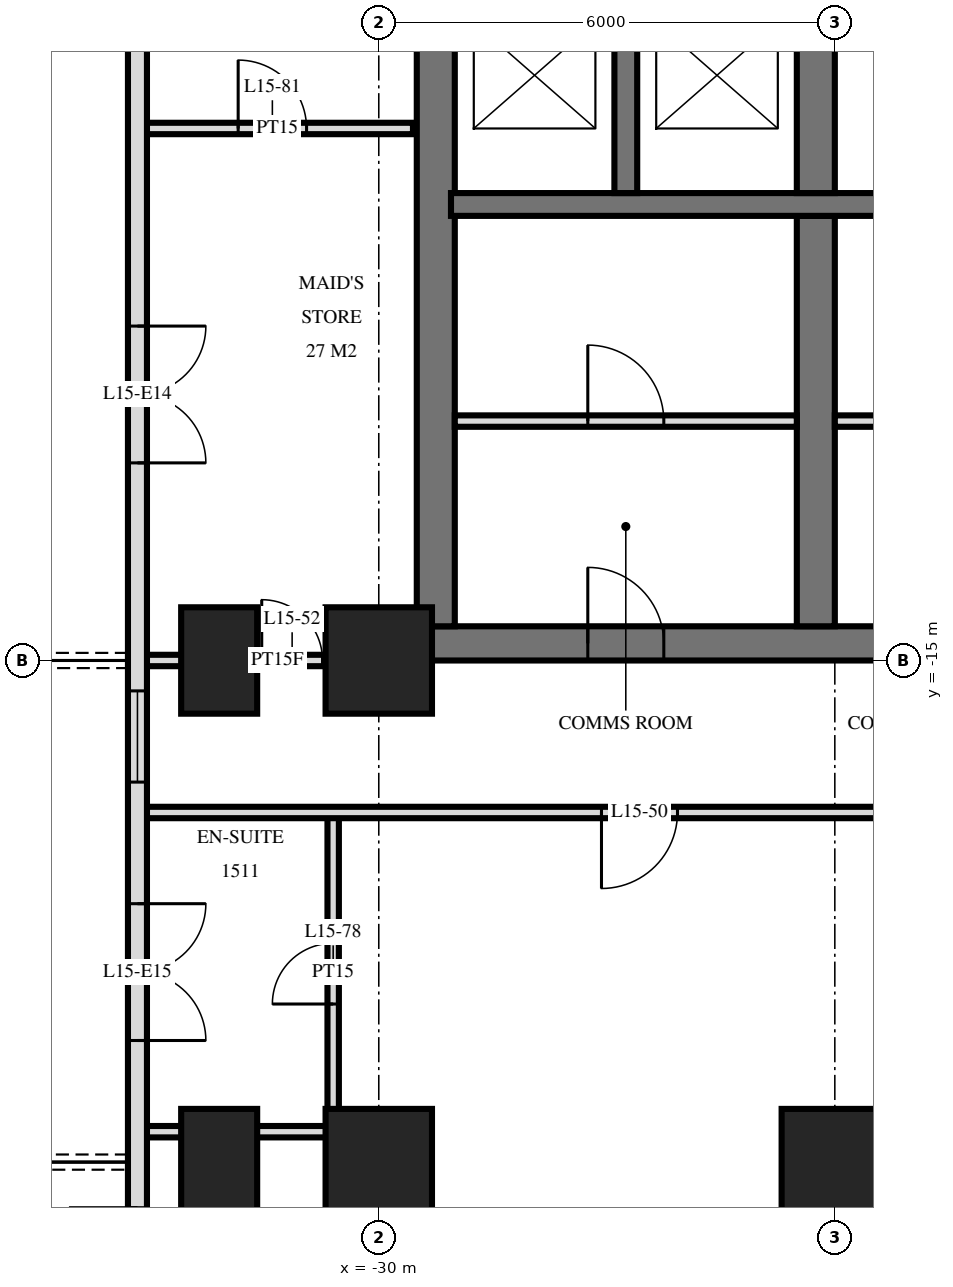
"""IFC4 building model, lengths in metres.
Left out: names, types, materials, properties, quantities, classifications, styles, units other than length and angle.
Written with IfcOpenShell. Run it as: python <this file> out.ifc"""

import sys

from ifc_helpers import new_model, si_unit, direction, frame, frame_2d, origin, origin_2d, place, context, subcontext, project, spatial, rectangle, extrude, element, fill, save


model = new_model("IFC4")
c1 = context("Model", 3, precision=1e-05, world=origin(), true_north=direction((0.0, 1.0)))
c2 = subcontext(c1, "Body", "Model", "MODEL_VIEW")
j1 = project(units=[si_unit("LENGTHUNIT", "METRE"), si_unit("PLANEANGLEUNIT", "RADIAN")], contexts=[c1])
p1 = place(None, origin())
s1 = spatial("IfcSite", under=j1, at=p1, CompositionType="ELEMENT")
p2 = place(p1, origin())
s2 = spatial("IfcBuilding", under=s1, at=p2, CompositionType="ELEMENT")
p3 = place(p2, frame((0.0, 0.0, 63.6)))
s3 = spatial("IfcBuildingStorey", under=s2, at=p3, CompositionType="ELEMENT", Elevation=63.6)
for number, where, z_axis, x_axis in (
    (1, (-32.1, -21.6, 0.0), (0.0, 0.0, 1.0), (0.0, 1.0, 0.0)),
    (2, (-32.1, -15.0, 0.0), (0.0, 0.0, 1.0), (0.0, 1.0, 0.0)),
):
    element("IfcColumn", number, at=place(p3, frame(where, z_axis=z_axis, x_axis=x_axis)), inside=s3, PredefinedType="COLUMN", context=c2, shape_type="SweptSolid", body=[
        extrude(rectangle(XDim=1.4, YDim=1.0, at=origin_2d()), origin(), (0.0, 0.0, 1.0), 3.6),
    ])
for number, where, z_axis, x_axis in (
    (3, (-30.0, -21.6, 0.0), (0.0, 0.0, 1.0), (1.0, 0.0, 0.0)),
    (4, (-30.0, -15.0, 0.0), (0.0, 0.0, 1.0), (1.0, 0.0, 0.0)),
    (5, (-24.0, -21.6, 0.0), (0.0, 0.0, 1.0), (1.0, 0.0, 0.0)),
):
    element("IfcColumn", number, at=place(p3, frame(where, z_axis=z_axis, x_axis=x_axis)), inside=s3, PredefinedType="COLUMN", context=c2, shape_type="SweptSolid", body=[
        extrude(rectangle(XDim=1.4, YDim=1.4, at=origin_2d()), origin(), (0.0, 0.0, 1.0), 3.6),
    ])
p4 = place(p3, frame((-29.5, -14.775, 0.0), z_axis=(0.0, 0.0, 1.0), x_axis=(1.0, 0.0, 0.0)))
e6 = element("IfcWall", 6, at=p4, inside=s3, PredefinedType="SHEAR", context=c2, shape_type="SweptSolid", body=[
    extrude(rectangle(XDim=19.5, YDim=0.45, at=frame_2d((9.75, 0.0))), origin(), (0.0, 0.0, 1.0), 3.6),
])
p5 = place(p4, frame((11.2, 0.0, 0.0)))
e7 = element("IfcOpeningElement", 7, at=p5, cuts=e6, PredefinedType="OPENING", context=c2, shape_type="SweptSolid", body=[
    extrude(rectangle(XDim=1.2, YDim=2.1, at=frame_2d((0.6, 1.05))), frame((0.0, 0.235, 0.0), z_axis=(0.0, -1.0, 0.0), x_axis=(1.0, 0.0, 0.0)), (0.0, 0.0, 1.0), 0.47),
])
p6 = place(p4, frame((14.25, 0.0, 0.0)))
e8 = element("IfcOpeningElement", 8, at=p6, cuts=e6, PredefinedType="OPENING", context=c2, shape_type="SweptSolid", body=[
    extrude(rectangle(XDim=1.1, YDim=2.1, at=frame_2d((0.55, 1.05))), frame((0.0, 0.235, 0.0), z_axis=(0.0, -1.0, 0.0), x_axis=(1.0, 0.0, 0.0)), (0.0, 0.0, 1.0), 0.47),
])
p7 = place(p4, frame((8.5, 0.0, 0.0)))
e9 = element("IfcOpeningElement", 9, at=p7, cuts=e6, PredefinedType="OPENING", context=c2, shape_type="SweptSolid", body=[
    extrude(rectangle(XDim=0.9, YDim=2.1, at=frame_2d((0.45, 1.05))), frame((0.0, 0.235, 0.0), z_axis=(0.0, -1.0, 0.0), x_axis=(1.0, 0.0, 0.0)), (0.0, 0.0, 1.0), 0.47),
])
p8 = place(p4, frame((6.05, 0.0, 0.0)))
e10 = element("IfcOpeningElement", 10, at=p8, cuts=e6, PredefinedType="OPENING", context=c2, shape_type="SweptSolid", body=[
    extrude(rectangle(XDim=1.0, YDim=2.1, at=frame_2d((0.5, 1.05))), frame((0.0, 0.235, 0.0), z_axis=(0.0, -1.0, 0.0), x_axis=(1.0, 0.0, 0.0)), (0.0, 0.0, 1.0), 0.47),
])
p9 = place(p4, frame((2.25, 0.0, 0.0)))
e11 = element("IfcOpeningElement", 11, at=p9, cuts=e6, PredefinedType="OPENING", context=c2, shape_type="SweptSolid", body=[
    extrude(rectangle(XDim=1.0, YDim=2.1, at=frame_2d((0.5, 1.05))), frame((0.0, 0.235, 0.0), z_axis=(0.0, -1.0, 0.0), x_axis=(1.0, 0.0, 0.0)), (0.0, 0.0, 1.0), 0.47),
])
p10 = place(p3, frame((-29.25, -14.55, 0.0), z_axis=(0.0, 0.0, 1.0), x_axis=(0.0, 1.0, 0.0)))
e12 = element("IfcWall", 12, at=p10, inside=s3, PredefinedType="SHEAR", context=c2, shape_type="SweptSolid", body=[
    extrude(rectangle(XDim=14.1, YDim=0.5, at=frame_2d((7.05, 0.0))), origin(), (0.0, 0.0, 1.0), 3.6),
])
p11 = place(p3, frame((-29.05, -9.0, 0.0), z_axis=(0.0, 0.0, 1.0), x_axis=(1.0, 0.0, 0.0)))
e13 = element("IfcWall", 13, at=p11, inside=s3, PredefinedType="SHEAR", context=c2, shape_type="SweptSolid", body=[
    extrude(rectangle(XDim=18.7, YDim=0.3, at=frame_2d((9.35, 0.0))), origin(), (0.0, 0.0, 1.0), 3.6),
])
p12 = place(p11, frame((13.8, 0.0, 0.0)))
e14 = element("IfcOpeningElement", 14, at=p12, cuts=e13, PredefinedType="OPENING", context=c2, shape_type="SweptSolid", body=[
    extrude(rectangle(XDim=1.1, YDim=2.1, at=frame_2d((0.55, 1.05))), frame((0.0, 0.16, 0.0), z_axis=(0.0, -1.0, 0.0), x_axis=(1.0, 0.0, 0.0)), (0.0, 0.0, 1.0), 0.32),
])
p13 = place(p3, frame((-24.25, -8.85, 0.0), z_axis=(0.0, 0.0, 1.0), x_axis=(0.0, 1.0, 0.0)))
e15 = element("IfcWall", 15, at=p13, inside=s3, PredefinedType="SHEAR", context=c2, shape_type="SweptSolid", body=[
    extrude(rectangle(XDim=2.3, YDim=0.5, at=frame_2d((1.15, 0.0))), origin(), (0.0, 0.0, 1.0), 3.6),
])
p14 = place(p3, frame((-24.25, -14.55, 0.0), z_axis=(0.0, 0.0, 1.0), x_axis=(0.0, 1.0, 0.0)))
e16 = element("IfcWall", 16, at=p14, inside=s3, PredefinedType="SHEAR", context=c2, shape_type="SweptSolid", body=[
    extrude(rectangle(XDim=5.4, YDim=0.5, at=frame_2d((2.7, 0.0))), origin(), (0.0, 0.0, 1.0), 3.6),
])
p15 = place(p3, frame((-26.75, -8.85, 0.0), z_axis=(0.0, 0.0, 1.0), x_axis=(0.0, 1.0, 0.0)))
e17 = element("IfcWall", 17, at=p15, inside=s3, PredefinedType="SHEAR", context=c2, shape_type="SweptSolid", body=[
    extrude(rectangle(XDim=2.3, YDim=0.3, at=frame_2d((1.15, 0.0))), origin(), (0.0, 0.0, 1.0), 3.6),
])
p16 = place(p3, frame((-33.175, -3.325, 0.0), z_axis=(0.0, 0.0, 1.0), x_axis=(0.0, -1.0, 0.0)))
e18 = element("IfcWall", 18, at=p16, inside=s3, PredefinedType="SOLIDWALL", context=c2, shape_type="SweptSolid", body=[
    extrude(rectangle(XDim=21.551, YDim=0.25, at=frame_2d((10.775, 0.0))), origin(), (0.0, 0.0, 1.0), 3.32),
])
p17 = place(p16, frame((7.275, 0.0, 0.0)))
e19 = element("IfcOpeningElement", 19, at=p17, cuts=e18, PredefinedType="OPENING", context=c2, shape_type="SweptSolid", body=[
    extrude(rectangle(XDim=1.8, YDim=2.4, at=frame_2d((0.9, 1.2))), frame((0.0, 0.135, 0.0), z_axis=(0.0, -1.0, 0.0), x_axis=(1.0, 0.0, 0.0)), (0.0, 0.0, 1.0), 0.27),
])
p18 = place(p16, frame((12.075, 0.0, 0.3)))
e20 = element("IfcOpeningElement", 20, at=p18, cuts=e18, PredefinedType="OPENING", context=c2, shape_type="SweptSolid", body=[
    extrude(rectangle(XDim=1.2, YDim=2.1, at=frame_2d((0.6, 1.05))), frame((0.0, 0.135, 0.0), z_axis=(0.0, -1.0, 0.0), x_axis=(1.0, 0.0, 0.0)), (0.0, 0.0, 1.0), 0.27),
])
p19 = place(p16, frame((14.875, 0.0, 0.0)))
e21 = element("IfcOpeningElement", 21, at=p19, cuts=e18, PredefinedType="OPENING", context=c2, shape_type="SweptSolid", body=[
    extrude(rectangle(XDim=1.8, YDim=2.4, at=frame_2d((0.9, 1.2))), frame((0.0, 0.135, 0.0), z_axis=(0.0, -1.0, 0.0), x_axis=(1.0, 0.0, 0.0)), (0.0, 0.0, 1.0), 0.27),
])
p20 = place(p16, frame((18.875, 0.0, 0.0)))
e22 = element("IfcOpeningElement", 22, at=p20, cuts=e18, PredefinedType="OPENING", context=c2, shape_type="SweptSolid", body=[
    extrude(rectangle(XDim=1.8, YDim=2.4, at=frame_2d((0.9, 1.2))), frame((0.0, 0.135, 0.0), z_axis=(0.0, -1.0, 0.0), x_axis=(1.0, 0.0, 0.0)), (0.0, 0.0, 1.0), 0.27),
])
p21 = place(p3, frame((-24.0, -11.85, 0.0), z_axis=(0.0, 0.0, 1.0), x_axis=(1.0, 0.0, 0.0)))
e23 = element("IfcWall", 23, at=p21, inside=s3, PredefinedType="PARTITIONING", context=c2, shape_type="SweptSolid", body=[
    extrude(rectangle(XDim=2.1, YDim=0.15, at=frame_2d((1.05, 0.0))), origin(), (0.0, 0.0, 1.0), 3.3),
])
p22 = place(p21, frame((0.55, 0.0, 0.0)))
e24 = element("IfcOpeningElement", 24, at=p22, cuts=e23, PredefinedType="OPENING", context=c2, shape_type="SweptSolid", body=[
    extrude(rectangle(XDim=1.0, YDim=2.1, at=frame_2d((0.5, 1.05))), frame((0.0, 0.085, 0.0), z_axis=(0.0, -1.0, 0.0), x_axis=(1.0, 0.0, 0.0)), (0.0, 0.0, 1.0), 0.17),
])
p23 = place(p3, frame((-29.0, -11.85, 0.0), z_axis=(0.0, 0.0, 1.0), x_axis=(1.0, 0.0, 0.0)))
e25 = element("IfcWall", 25, at=p23, inside=s3, PredefinedType="PARTITIONING", context=c2, shape_type="SweptSolid", body=[
    extrude(rectangle(XDim=4.5, YDim=0.15, at=frame_2d((2.25, 0.0))), origin(), (0.0, 0.0, 1.0), 3.3),
])
p24 = place(p23, frame((1.75, 0.0, 0.0)))
e26 = element("IfcOpeningElement", 26, at=p24, cuts=e25, PredefinedType="OPENING", context=c2, shape_type="SweptSolid", body=[
    extrude(rectangle(XDim=1.0, YDim=2.1, at=frame_2d((0.5, 1.05))), frame((0.0, 0.085, 0.0), z_axis=(0.0, -1.0, 0.0), x_axis=(1.0, 0.0, 0.0)), (0.0, 0.0, 1.0), 0.17),
])
p25 = place(p3, frame((-30.6, -21.2, 0.0), z_axis=(0.0, 0.0, 1.0), x_axis=(0.0, 1.0, 0.0)))
e27 = element("IfcWall", 27, at=p25, inside=s3, PredefinedType="PARTITIONING", context=c2, shape_type="SweptSolid", body=[
    extrude(rectangle(XDim=4.2, YDim=0.15, at=frame_2d((2.1, 0.0))), origin(), (0.0, 0.0, 1.0), 3.32),
])
p26 = place(p25, frame((1.68, 0.0, 0.0)))
e28 = element("IfcOpeningElement", 28, at=p26, cuts=e27, PredefinedType="OPENING", context=c2, shape_type="SweptSolid", body=[
    extrude(rectangle(XDim=0.8, YDim=2.1, at=frame_2d((0.4, 1.05))), frame((0.0, 0.085, 0.0), z_axis=(0.0, -1.0, 0.0), x_axis=(1.0, 0.0, 0.0)), (0.0, 0.0, 1.0), 0.17),
])
p27 = place(p3, frame((-33.12, -21.2, 0.0), z_axis=(0.0, 0.0, 1.0), x_axis=(1.0, 0.0, 0.0)))
e29 = element("IfcWall", 29, at=p27, inside=s3, PredefinedType="PARTITIONING", context=c2, shape_type="SweptSolid", body=[
    extrude(rectangle(XDim=2.52, YDim=0.15, at=frame_2d((1.26, 0.0))), origin(), (0.0, 0.0, 1.0), 3.32),
])
p28 = place(p3, frame((-33.12, -17.0, 0.0), z_axis=(0.0, 0.0, 1.0), x_axis=(1.0, 0.0, 0.0)))
e30 = element("IfcWall", 30, at=p28, inside=s3, PredefinedType="PARTITIONING", context=c2, shape_type="SweptSolid", body=[
    extrude(rectangle(XDim=66.24, YDim=0.15, at=frame_2d((33.12, 0.0))), origin(), (0.0, 0.0, 1.0), 3.32),
])
p29 = place(p28, frame((12.27, 0.0, 0.0)))
e31 = element("IfcOpeningElement", 31, at=p29, cuts=e30, PredefinedType="OPENING", context=c2, shape_type="SweptSolid", body=[
    extrude(rectangle(XDim=1.0, YDim=2.1, at=frame_2d((0.5, 1.05))), frame((0.0, 0.085, 0.0), z_axis=(0.0, -1.0, 0.0), x_axis=(1.0, 0.0, 0.0)), (0.0, 0.0, 1.0), 0.17),
])
p30 = place(p28, frame((16.97, 0.0, 0.0)))
e32 = element("IfcOpeningElement", 32, at=p30, cuts=e30, PredefinedType="OPENING", context=c2, shape_type="SweptSolid", body=[
    extrude(rectangle(XDim=1.0, YDim=2.1, at=frame_2d((0.5, 1.05))), frame((0.0, 0.085, 0.0), z_axis=(0.0, -1.0, 0.0), x_axis=(1.0, 0.0, 0.0)), (0.0, 0.0, 1.0), 0.17),
])
p31 = place(p28, frame((18.27, 0.0, 0.0)))
e33 = element("IfcOpeningElement", 33, at=p31, cuts=e30, PredefinedType="OPENING", context=c2, shape_type="SweptSolid", body=[
    extrude(rectangle(XDim=1.0, YDim=2.1, at=frame_2d((0.5, 1.05))), frame((0.0, 0.085, 0.0), z_axis=(0.0, -1.0, 0.0), x_axis=(1.0, 0.0, 0.0)), (0.0, 0.0, 1.0), 0.17),
])
p32 = place(p28, frame((22.97, 0.0, 0.0)))
e34 = element("IfcOpeningElement", 34, at=p32, cuts=e30, PredefinedType="OPENING", context=c2, shape_type="SweptSolid", body=[
    extrude(rectangle(XDim=1.0, YDim=2.1, at=frame_2d((0.5, 1.05))), frame((0.0, 0.085, 0.0), z_axis=(0.0, -1.0, 0.0), x_axis=(1.0, 0.0, 0.0)), (0.0, 0.0, 1.0), 0.17),
])
p33 = place(p28, frame((24.27, 0.0, 0.0)))
e35 = element("IfcOpeningElement", 35, at=p33, cuts=e30, PredefinedType="OPENING", context=c2, shape_type="SweptSolid", body=[
    extrude(rectangle(XDim=1.0, YDim=2.1, at=frame_2d((0.5, 1.05))), frame((0.0, 0.085, 0.0), z_axis=(0.0, -1.0, 0.0), x_axis=(1.0, 0.0, 0.0)), (0.0, 0.0, 1.0), 0.17),
])
p34 = place(p28, frame((28.97, 0.0, 0.0)))
e36 = element("IfcOpeningElement", 36, at=p34, cuts=e30, PredefinedType="OPENING", context=c2, shape_type="SweptSolid", body=[
    extrude(rectangle(XDim=1.0, YDim=2.1, at=frame_2d((0.5, 1.05))), frame((0.0, 0.085, 0.0), z_axis=(0.0, -1.0, 0.0), x_axis=(1.0, 0.0, 0.0)), (0.0, 0.0, 1.0), 0.17),
])
p35 = place(p28, frame((30.27, 0.0, 0.0)))
e37 = element("IfcOpeningElement", 37, at=p35, cuts=e30, PredefinedType="OPENING", context=c2, shape_type="SweptSolid", body=[
    extrude(rectangle(XDim=1.0, YDim=2.1, at=frame_2d((0.5, 1.05))), frame((0.0, 0.085, 0.0), z_axis=(0.0, -1.0, 0.0), x_axis=(1.0, 0.0, 0.0)), (0.0, 0.0, 1.0), 0.17),
])
p36 = place(p28, frame((33.82, 0.0, 0.0)))
e38 = element("IfcOpeningElement", 38, at=p36, cuts=e30, PredefinedType="OPENING", context=c2, shape_type="SweptSolid", body=[
    extrude(rectangle(XDim=1.0, YDim=2.1, at=frame_2d((0.5, 1.05))), frame((0.0, 0.085, 0.0), z_axis=(0.0, -1.0, 0.0), x_axis=(1.0, 0.0, 0.0)), (0.0, 0.0, 1.0), 0.17),
])
p37 = place(p28, frame((46.27, 0.0, 0.0)))
e39 = element("IfcOpeningElement", 39, at=p37, cuts=e30, PredefinedType="OPENING", context=c2, shape_type="SweptSolid", body=[
    extrude(rectangle(XDim=1.0, YDim=2.1, at=frame_2d((0.5, 1.05))), frame((0.0, 0.085, 0.0), z_axis=(0.0, -1.0, 0.0), x_axis=(1.0, 0.0, 0.0)), (0.0, 0.0, 1.0), 0.17),
])
p38 = place(p28, frame((52.97, 0.0, 0.0)))
e40 = element("IfcOpeningElement", 40, at=p38, cuts=e30, PredefinedType="OPENING", context=c2, shape_type="SweptSolid", body=[
    extrude(rectangle(XDim=1.0, YDim=2.1, at=frame_2d((0.5, 1.05))), frame((0.0, 0.085, 0.0), z_axis=(0.0, -1.0, 0.0), x_axis=(1.0, 0.0, 0.0)), (0.0, 0.0, 1.0), 0.17),
])
p39 = place(p28, frame((6.05, 0.0, 0.0)))
e41 = element("IfcOpeningElement", 41, at=p39, cuts=e30, PredefinedType="OPENING", context=c2, shape_type="SweptSolid", body=[
    extrude(rectangle(XDim=1.0, YDim=2.1, at=frame_2d((0.5, 1.05))), frame((0.0, 0.085, 0.0), z_axis=(0.0, -1.0, 0.0), x_axis=(1.0, 0.0, 0.0)), (0.0, 0.0, 1.0), 0.17),
])
p40 = place(p28, frame((59.15, 0.0, 0.0)))
e42 = element("IfcOpeningElement", 42, at=p40, cuts=e30, PredefinedType="OPENING", context=c2, shape_type="SweptSolid", body=[
    extrude(rectangle(XDim=1.0, YDim=2.1, at=frame_2d((0.5, 1.05))), frame((0.0, 0.085, 0.0), z_axis=(0.0, -1.0, 0.0), x_axis=(1.0, 0.0, 0.0)), (0.0, 0.0, 1.0), 0.17),
])
p41 = place(p3, frame((-33.12, -15.0, 0.0), z_axis=(0.0, 0.0, 1.0), x_axis=(1.0, 0.0, 0.0)))
e43 = element("IfcWall", 43, at=p41, inside=s3, PredefinedType="PARTITIONING", context=c2, shape_type="SweptSolid", body=[
    extrude(rectangle(XDim=3.57, YDim=0.15, at=frame_2d((1.785, 0.0))), origin(), (0.0, 0.0, 1.0), 3.32),
])
p42 = place(p41, frame((1.58, 0.0, 0.0)))
e44 = element("IfcOpeningElement", 44, at=p42, cuts=e43, PredefinedType="OPENING", context=c2, shape_type="SweptSolid", body=[
    extrude(rectangle(XDim=0.8, YDim=2.1, at=frame_2d((0.4, 1.05))), frame((0.0, 0.085, 0.0), z_axis=(0.0, -1.0, 0.0), x_axis=(1.0, 0.0, 0.0)), (0.0, 0.0, 1.0), 0.17),
])
p43 = place(p3, frame((-33.12, -8.0, 0.0), z_axis=(0.0, 0.0, 1.0), x_axis=(1.0, 0.0, 0.0)))
e45 = element("IfcWall", 45, at=p43, inside=s3, PredefinedType="PARTITIONING", context=c2, shape_type="SweptSolid", body=[
    extrude(rectangle(XDim=3.57, YDim=0.15, at=frame_2d((1.785, 0.0))), origin(), (0.0, 0.0, 1.0), 3.32),
])
p44 = place(p43, frame((1.27, 0.0, 0.0)))
e46 = element("IfcOpeningElement", 46, at=p44, cuts=e45, PredefinedType="OPENING", context=c2, shape_type="SweptSolid", body=[
    extrude(rectangle(XDim=0.9, YDim=2.1, at=frame_2d((0.45, 1.05))), frame((0.0, 0.085, 0.0), z_axis=(0.0, -1.0, 0.0), x_axis=(1.0, 0.0, 0.0)), (0.0, 0.0, 1.0), 0.17),
])
p45 = place(p17, origin())
e47 = element("IfcDoor", 47, at=p45, inside=s3, OperationType="DOUBLE_DOOR_SINGLE_SWING", PredefinedType="DOOR", context=c2, shape_type="SweptSolid", body=[
    extrude(rectangle(XDim=1.8, YDim=2.4, at=frame_2d((0.9, 1.2))), frame((0.0, 0.025, 0.0), z_axis=(0.0, -1.0, 0.0), x_axis=(1.0, 0.0, 0.0)), (0.0, 0.0, 1.0), 0.05),
])
fill(e19, e47)
p46 = place(p18, origin())
e48 = element("IfcWindow", 48, at=p46, inside=s3, PartitioningType="SINGLE_PANEL", PredefinedType="WINDOW", context=c2, shape_type="SweptSolid", body=[
    extrude(rectangle(XDim=1.2, YDim=2.1, at=frame_2d((0.6, 1.05))), frame((0.0, 0.03, 0.0), z_axis=(0.0, -1.0, 0.0), x_axis=(1.0, 0.0, 0.0)), (0.0, 0.0, 1.0), 0.06),
])
fill(e20, e48)
p47 = place(p19, origin())
e49 = element("IfcDoor", 49, at=p47, inside=s3, OperationType="DOUBLE_DOOR_SINGLE_SWING", PredefinedType="DOOR", context=c2, shape_type="SweptSolid", body=[
    extrude(rectangle(XDim=1.8, YDim=2.4, at=frame_2d((0.9, 1.2))), frame((0.0, 0.025, 0.0), z_axis=(0.0, -1.0, 0.0), x_axis=(1.0, 0.0, 0.0)), (0.0, 0.0, 1.0), 0.05),
])
fill(e21, e49)
p48 = place(p9, origin())
e50 = element("IfcDoor", 50, at=p48, inside=s3, OperationType="SINGLE_SWING_RIGHT", PredefinedType="DOOR", context=c2, shape_type="SweptSolid", body=[
    extrude(rectangle(XDim=1.0, YDim=2.1, at=frame_2d((0.5, 1.05))), frame((0.0, 0.025, 0.0), z_axis=(0.0, -1.0, 0.0), x_axis=(1.0, 0.0, 0.0)), (0.0, 0.0, 1.0), 0.05),
])
fill(e11, e50)
p49 = place(p24, origin())
e51 = element("IfcDoor", 51, at=p49, inside=s3, OperationType="SINGLE_SWING_RIGHT", PredefinedType="DOOR", context=c2, shape_type="SweptSolid", body=[
    extrude(rectangle(XDim=1.0, YDim=2.1, at=frame_2d((0.5, 1.05))), frame((0.0, 0.025, 0.0), z_axis=(0.0, -1.0, 0.0), x_axis=(1.0, 0.0, 0.0)), (0.0, 0.0, 1.0), 0.05),
])
fill(e26, e51)
p50 = place(p39, frame((0.5, 0.0, 0.0), z_axis=(0.0, 0.0, 1.0), x_axis=(-1.0, 0.0, 0.0)))
e52 = element("IfcDoor", 52, at=p50, inside=s3, OperationType="SINGLE_SWING_LEFT", PredefinedType="DOOR", context=c2, shape_type="SweptSolid", body=[
    extrude(rectangle(XDim=1.0, YDim=2.1, at=frame_2d((0.0, 1.05))), frame((0.0, -0.025, 0.0), z_axis=(0.0, 1.0, 0.0), x_axis=(-1.0, 0.0, 0.0)), (0.0, 0.0, 1.0), 0.05),
])
fill(e41, e52)
p51 = place(p42, origin())
e53 = element("IfcDoor", 53, at=p51, inside=s3, OperationType="SINGLE_SWING_RIGHT", PredefinedType="DOOR", context=c2, shape_type="SweptSolid", body=[
    extrude(rectangle(XDim=0.8, YDim=2.1, at=frame_2d((0.4, 1.05))), frame((0.0, 0.025, 0.0), z_axis=(0.0, -1.0, 0.0), x_axis=(1.0, 0.0, 0.0)), (0.0, 0.0, 1.0), 0.05),
])
fill(e44, e53)
p52 = place(p26, origin())
e54 = element("IfcDoor", 54, at=p52, inside=s3, OperationType="SINGLE_SWING_RIGHT", PredefinedType="DOOR", context=c2, shape_type="SweptSolid", body=[
    extrude(rectangle(XDim=0.8, YDim=2.1, at=frame_2d((0.4, 1.05))), frame((0.0, 0.025, 0.0), z_axis=(0.0, -1.0, 0.0), x_axis=(1.0, 0.0, 0.0)), (0.0, 0.0, 1.0), 0.05),
])
fill(e28, e54)
p53 = place(p44, origin())
e55 = element("IfcDoor", 55, at=p53, inside=s3, OperationType="SINGLE_SWING_RIGHT", PredefinedType="DOOR", context=c2, shape_type="SweptSolid", body=[
    extrude(rectangle(XDim=0.9, YDim=2.1, at=frame_2d((0.45, 1.05))), frame((0.0, 0.025, 0.0), z_axis=(0.0, -1.0, 0.0), x_axis=(1.0, 0.0, 0.0)), (0.0, 0.0, 1.0), 0.05),
])
fill(e46, e55)
save(model, sys.argv[1])
